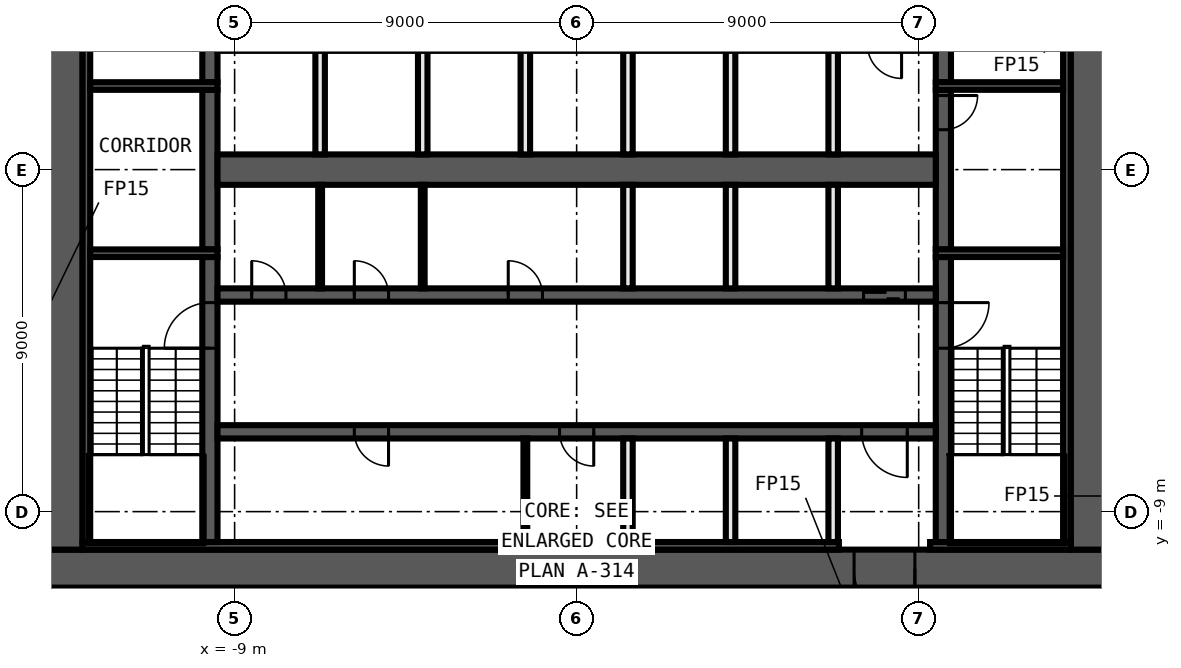
"""IFC4 building model, lengths in metres.
Left out: names, types, materials, properties, quantities, classifications, styles, units other than length and angle.
Written with IfcOpenShell. Run it as: python <this file> out.ifc"""

import sys

from ifc_helpers import new_model, si_unit, direction, frame, frame_2d, origin, place, context, subcontext, project, spatial, rectangle, extrude, element, fill, save


model = new_model("IFC4")
c1 = context("Model", 3, precision=1e-05, world=origin(), true_north=direction((0.0, 1.0)))
c2 = subcontext(c1, "Body", "Model", "MODEL_VIEW")
j1 = project(units=[si_unit("LENGTHUNIT", "METRE"), si_unit("PLANEANGLEUNIT", "RADIAN")], contexts=[c1])
p1 = place(None, origin())
s1 = spatial("IfcSite", under=j1, at=p1, CompositionType="ELEMENT")
p2 = place(p1, origin())
s2 = spatial("IfcBuilding", under=s1, at=p2, CompositionType="ELEMENT")
p3 = place(p2, frame((0.0, 0.0, 102.6)))
s3 = spatial("IfcBuildingStorey", under=s2, at=p3, CompositionType="ELEMENT", Elevation=102.6)
p4 = place(p3, frame((14.0, -10.5, 0.0), z_axis=(0.0, 0.0, 1.0), x_axis=(-1.0, 0.0, 0.0)))
e1 = element("IfcWall", 1, at=p4, inside=s3, PredefinedType="SHEAR", context=c2, shape_type="SweptSolid", body=[
    extrude(rectangle(XDim=28.0, YDim=1.0, at=frame_2d((14.0, 0.0))), origin(), (0.0, 0.0, 1.0), 3.3),
])
p5 = place(p4, frame((5.1, 0.0, 0.0)))
e2 = element("IfcOpeningElement", 2, at=p5, cuts=e1, PredefinedType="OPENING", context=c2, shape_type="SweptSolid", body=[
    extrude(rectangle(XDim=1.6, YDim=2.1, at=frame_2d((0.8, 1.05))), frame((0.0, 0.51, 0.0), z_axis=(0.0, -1.0, 0.0), x_axis=(1.0, 0.0, 0.0)), (0.0, 0.0, 1.0), 1.02),
])
for number, where, z_axis, x_axis in (
    (3, (13.5, 10.0, 0.0), (0.0, 0.0, 1.0), (0.0, -1.0, 0.0)),
    (4, (-13.5, -10.0, 0.0), (0.0, 0.0, 1.0), (0.0, 1.0, 0.0)),
):
    element("IfcWall", number, at=place(p3, frame(where, z_axis=z_axis, x_axis=x_axis)), inside=s3, PredefinedType="SHEAR", context=c2, shape_type="SweptSolid", body=[
        extrude(rectangle(XDim=20.0, YDim=1.0, at=frame_2d((10.0, 0.0))), origin(), (0.0, 0.0, 1.0), 3.3),
    ])
p6 = place(p3, frame((13.0, -9.9, 0.0), z_axis=(0.0, 0.0, 1.0), x_axis=(-1.0, 0.0, 0.0)))
e5 = element("IfcWall", 5, at=p6, inside=s3, PredefinedType="SHEAR", context=c2, shape_type="SweptSolid", body=[
    extrude(rectangle(XDim=3.7, YDim=0.2, at=frame_2d((1.85, 0.0))), origin(), (0.0, 0.0, 1.0), 3.3),
])
p7 = place(p3, frame((6.9, -9.9, 0.0), z_axis=(0.0, 0.0, 1.0), x_axis=(-1.0, 0.0, 0.0)))
e6 = element("IfcWall", 6, at=p7, inside=s3, PredefinedType="SHEAR", context=c2, shape_type="SweptSolid", body=[
    extrude(rectangle(XDim=19.9, YDim=0.2, at=frame_2d((9.95, 0.0))), origin(), (0.0, 0.0, 1.0), 3.3),
])
for number, where, z_axis, x_axis in (
    (7, (12.9, 9.8, 0.0), (0.0, 0.0, 1.0), (0.0, -1.0, 0.0)),
    (8, (-12.9, -9.8, 0.0), (0.0, 0.0, 1.0), (0.0, 1.0, 0.0)),
):
    element("IfcWall", number, at=place(p3, frame(where, z_axis=z_axis, x_axis=x_axis)), inside=s3, PredefinedType="SHEAR", context=c2, shape_type="SweptSolid", body=[
        extrude(rectangle(XDim=19.6, YDim=0.2, at=frame_2d((9.8, 0.0))), origin(), (0.0, 0.0, 1.0), 3.3),
    ])
p8 = place(p3, frame((9.65, -2.3, 0.0), z_axis=(0.0, 0.0, 1.0), x_axis=(0.0, -1.0, 0.0)))
e9 = element("IfcWall", 9, at=p8, inside=s3, PredefinedType="SHEAR", context=c2, shape_type="SweptSolid", body=[
    extrude(rectangle(XDim=7.5, YDim=0.4, at=frame_2d((3.75, 0.0))), origin(), (0.0, 0.0, 1.0), 3.3),
])
p9 = place(p8, frame((1.2, 0.0, 0.0)))
e10 = element("IfcOpeningElement", 10, at=p9, cuts=e9, PredefinedType="OPENING", context=c2, shape_type="SweptSolid", body=[
    extrude(rectangle(XDim=1.2, YDim=2.1, at=frame_2d((0.6, 1.05))), frame((0.0, 0.21, 0.0), z_axis=(0.0, -1.0, 0.0), x_axis=(1.0, 0.0, 0.0)), (0.0, 0.0, 1.0), 0.42),
])
p10 = place(p3, frame((9.65, 2.1, 0.0), z_axis=(0.0, 0.0, 1.0), x_axis=(0.0, -1.0, 0.0)))
e11 = element("IfcWall", 11, at=p10, inside=s3, PredefinedType="SHEAR", context=c2, shape_type="SweptSolid", body=[
    extrude(rectangle(XDim=4.2, YDim=0.4, at=frame_2d((2.1, 0.0))), origin(), (0.0, 0.0, 1.0), 3.3),
])
p11 = place(p10, frame((0.15, 0.0, 0.0)))
e12 = element("IfcOpeningElement", 12, at=p11, cuts=e11, PredefinedType="OPENING", context=c2, shape_type="SweptSolid", body=[
    extrude(rectangle(XDim=0.9, YDim=2.1, at=frame_2d((0.45, 1.05))), frame((0.0, 0.21, 0.0), z_axis=(0.0, -1.0, 0.0), x_axis=(1.0, 0.0, 0.0)), (0.0, 0.0, 1.0), 0.42),
])
p12 = place(p3, frame((9.65, 9.8, 0.0), z_axis=(0.0, 0.0, 1.0), x_axis=(0.0, -1.0, 0.0)))
e13 = element("IfcWall", 13, at=p12, inside=s3, PredefinedType="SHEAR", context=c2, shape_type="SweptSolid", body=[
    extrude(rectangle(XDim=7.5, YDim=0.4, at=frame_2d((3.75, 0.0))), origin(), (0.0, 0.0, 1.0), 3.3),
])
p13 = place(p12, frame((5.1, 0.0, 0.0)))
e14 = element("IfcOpeningElement", 14, at=p13, cuts=e13, PredefinedType="OPENING", context=c2, shape_type="SweptSolid", body=[
    extrude(rectangle(XDim=1.2, YDim=2.1, at=frame_2d((0.6, 1.05))), frame((0.0, 0.21, 0.0), z_axis=(0.0, -1.0, 0.0), x_axis=(1.0, 0.0, 0.0)), (0.0, 0.0, 1.0), 0.42),
])
p14 = place(p3, frame((-9.65, -9.8, 0.0), z_axis=(0.0, 0.0, 1.0), x_axis=(0.0, 1.0, 0.0)))
e15 = element("IfcWall", 15, at=p14, inside=s3, PredefinedType="SHEAR", context=c2, shape_type="SweptSolid", body=[
    extrude(rectangle(XDim=7.5, YDim=0.4, at=frame_2d((3.75, 0.0))), origin(), (0.0, 0.0, 1.0), 3.3),
])
p15 = place(p14, frame((5.1, 0.0, 0.0)))
e16 = element("IfcOpeningElement", 16, at=p15, cuts=e15, PredefinedType="OPENING", context=c2, shape_type="SweptSolid", body=[
    extrude(rectangle(XDim=1.2, YDim=2.1, at=frame_2d((0.6, 1.05))), frame((0.0, 0.21, 0.0), z_axis=(0.0, -1.0, 0.0), x_axis=(1.0, 0.0, 0.0)), (0.0, 0.0, 1.0), 0.42),
])
p16 = place(p3, frame((-9.65, -2.1, 0.0), z_axis=(0.0, 0.0, 1.0), x_axis=(0.0, 1.0, 0.0)))
e17 = element("IfcWall", 17, at=p16, inside=s3, PredefinedType="SHEAR", context=c2, shape_type="SweptSolid", body=[
    extrude(rectangle(XDim=4.2, YDim=0.4, at=frame_2d((2.1, 0.0))), origin(), (0.0, 0.0, 1.0), 3.3),
])
p17 = place(p3, frame((-9.65, 2.3, 0.0), z_axis=(0.0, 0.0, 1.0), x_axis=(0.0, 1.0, 0.0)))
e18 = element("IfcWall", 18, at=p17, inside=s3, PredefinedType="SHEAR", context=c2, shape_type="SweptSolid", body=[
    extrude(rectangle(XDim=7.5, YDim=0.4, at=frame_2d((3.75, 0.0))), origin(), (0.0, 0.0, 1.0), 3.3),
])
p18 = place(p17, frame((1.2, 0.0, 0.0)))
e19 = element("IfcOpeningElement", 19, at=p18, cuts=e18, PredefinedType="OPENING", context=c2, shape_type="SweptSolid", body=[
    extrude(rectangle(XDim=1.2, YDim=2.1, at=frame_2d((0.6, 1.05))), frame((0.0, 0.21, 0.0), z_axis=(0.0, -1.0, 0.0), x_axis=(1.0, 0.0, 0.0)), (0.0, 0.0, 1.0), 0.42),
])
for number, where, z_axis, x_axis in (
    (20, (9.45, 2.2, 0.0), (0.0, 0.0, 1.0), (1.0, 0.0, 0.0)),
    (21, (-9.45, 2.2, 0.0), (0.0, 0.0, 1.0), (-1.0, 0.0, 0.0)),
    (22, (9.45, -2.2, 0.0), (0.0, 0.0, 1.0), (1.0, 0.0, 0.0)),
    (23, (-9.45, -2.2, 0.0), (0.0, 0.0, 1.0), (-1.0, 0.0, 0.0)),
):
    element("IfcWall", number, at=place(p3, frame(where, z_axis=z_axis, x_axis=x_axis)), inside=s3, PredefinedType="SHEAR", context=c2, shape_type="SweptSolid", body=[
        extrude(rectangle(XDim=3.35, YDim=0.2, at=frame_2d((1.675, 0.0))), origin(), (0.0, 0.0, 1.0), 3.3),
    ])
p19 = place(p3, frame((-9.45, -3.3, 0.0), z_axis=(0.0, 0.0, 1.0), x_axis=(1.0, 0.0, 0.0)))
e24 = element("IfcWall", 24, at=p19, inside=s3, PredefinedType="SHEAR", context=c2, shape_type="SweptSolid", body=[
    extrude(rectangle(XDim=18.9, YDim=0.35, at=frame_2d((9.45, 0.0))), origin(), (0.0, 0.0, 1.0), 3.3),
])
p20 = place(p19, frame((17.0, 0.0, 0.0)))
e25 = element("IfcOpeningElement", 25, at=p20, cuts=e24, PredefinedType="OPENING", context=c2, shape_type="SweptSolid", body=[
    extrude(rectangle(XDim=1.1, YDim=2.1, at=frame_2d((0.55, 1.05))), frame((0.0, 0.185, 0.0), z_axis=(0.0, -1.0, 0.0), x_axis=(1.0, 0.0, 0.0)), (0.0, 0.0, 1.0), 0.37),
])
p21 = place(p19, frame((0.9, 0.0, 0.0)))
e26 = element("IfcOpeningElement", 26, at=p21, cuts=e24, PredefinedType="OPENING", context=c2, shape_type="SweptSolid", body=[
    extrude(rectangle(XDim=0.9, YDim=2.1, at=frame_2d((0.45, 1.05))), frame((0.0, 0.185, 0.0), z_axis=(0.0, -1.0, 0.0), x_axis=(1.0, 0.0, 0.0)), (0.0, 0.0, 1.0), 0.37),
])
p22 = place(p19, frame((3.6, 0.0, 0.0)))
e27 = element("IfcOpeningElement", 27, at=p22, cuts=e24, PredefinedType="OPENING", context=c2, shape_type="SweptSolid", body=[
    extrude(rectangle(XDim=0.9, YDim=2.1, at=frame_2d((0.45, 1.05))), frame((0.0, 0.185, 0.0), z_axis=(0.0, -1.0, 0.0), x_axis=(1.0, 0.0, 0.0)), (0.0, 0.0, 1.0), 0.37),
])
p23 = place(p19, frame((7.65, 0.0, 0.0)))
e28 = element("IfcOpeningElement", 28, at=p23, cuts=e24, PredefinedType="OPENING", context=c2, shape_type="SweptSolid", body=[
    extrude(rectangle(XDim=0.9, YDim=2.1, at=frame_2d((0.45, 1.05))), frame((0.0, 0.185, 0.0), z_axis=(0.0, -1.0, 0.0), x_axis=(1.0, 0.0, 0.0)), (0.0, 0.0, 1.0), 0.37),
])
p24 = place(p3, frame((9.45, -6.9, 0.0), z_axis=(0.0, 0.0, 1.0), x_axis=(-1.0, 0.0, 0.0)))
e29 = element("IfcWall", 29, at=p24, inside=s3, PredefinedType="SHEAR", context=c2, shape_type="SweptSolid", body=[
    extrude(rectangle(XDim=18.9, YDim=0.35, at=frame_2d((9.45, 0.0))), origin(), (0.0, 0.0, 1.0), 3.3),
])
p25 = place(p24, frame((0.75, 0.0, 0.0)))
e30 = element("IfcOpeningElement", 30, at=p25, cuts=e29, PredefinedType="OPENING", context=c2, shape_type="SweptSolid", body=[
    extrude(rectangle(XDim=1.2, YDim=2.1, at=frame_2d((0.6, 1.05))), frame((0.0, 0.185, 0.0), z_axis=(0.0, -1.0, 0.0), x_axis=(1.0, 0.0, 0.0)), (0.0, 0.0, 1.0), 0.37),
])
p26 = place(p24, frame((14.4, 0.0, 0.0)))
e31 = element("IfcOpeningElement", 31, at=p26, cuts=e29, PredefinedType="OPENING", context=c2, shape_type="SweptSolid", body=[
    extrude(rectangle(XDim=0.9, YDim=2.1, at=frame_2d((0.45, 1.05))), frame((0.0, 0.185, 0.0), z_axis=(0.0, -1.0, 0.0), x_axis=(1.0, 0.0, 0.0)), (0.0, 0.0, 1.0), 0.37),
])
p27 = place(p24, frame((9.0, 0.0, 0.0)))
e32 = element("IfcOpeningElement", 32, at=p27, cuts=e29, PredefinedType="OPENING", context=c2, shape_type="SweptSolid", body=[
    extrude(rectangle(XDim=0.9, YDim=2.1, at=frame_2d((0.45, 1.05))), frame((0.0, 0.185, 0.0), z_axis=(0.0, -1.0, 0.0), x_axis=(1.0, 0.0, 0.0)), (0.0, 0.0, 1.0), 0.37),
])
p28 = place(p3, frame((-9.45, 0.0, 0.0), z_axis=(0.0, 0.0, 1.0), x_axis=(1.0, 0.0, 0.0)))
e33 = element("IfcWall", 33, at=p28, inside=s3, PredefinedType="SHEAR", context=c2, shape_type="SweptSolid", body=[
    extrude(rectangle(XDim=18.9, YDim=0.8, at=frame_2d((9.45, 0.0))), origin(), (0.0, 0.0, 1.0), 3.3),
])
for number, where, z_axis, x_axis in (
    (34, (6.75, -9.8, 0.0), (0.0, 0.0, 1.0), (0.0, 1.0, 0.0)),
    (35, (6.75, -3.125, 0.0), (0.0, 0.0, 1.0), (0.0, 1.0, 0.0)),
    (36, (6.75, 0.4, 0.0), (0.0, 0.0, 1.0), (0.0, 1.0, 0.0)),
    (37, (4.05, -9.8, 0.0), (0.0, 0.0, 1.0), (0.0, 1.0, 0.0)),
    (38, (4.05, -3.125, 0.0), (0.0, 0.0, 1.0), (0.0, 1.0, 0.0)),
    (39, (4.05, 0.4, 0.0), (0.0, 0.0, 1.0), (0.0, 1.0, 0.0)),
    (40, (1.35, -9.8, 0.0), (0.0, 0.0, 1.0), (0.0, 1.0, 0.0)),
    (41, (1.35, -3.125, 0.0), (0.0, 0.0, 1.0), (0.0, 1.0, 0.0)),
    (42, (1.35, 0.4, 0.0), (0.0, 0.0, 1.0), (0.0, 1.0, 0.0)),
):
    element("IfcWall", number, at=place(p3, frame(where, z_axis=z_axis, x_axis=x_axis)), inside=s3, PredefinedType="SOLIDWALL", context=c2, shape_type="SweptSolid", body=[
        extrude(rectangle(XDim=2.725, YDim=0.25, at=frame_2d((1.363, 0.0))), origin(), (0.0, 0.0, 1.0), 3.3),
    ])
p29 = place(p3, frame((-1.35, -9.8, 0.0), z_axis=(0.0, 0.0, 1.0), x_axis=(0.0, 1.0, 0.0)))
e43 = element("IfcWall", 43, at=p29, inside=s3, PredefinedType="PARTITIONING", context=c2, shape_type="SweptSolid", body=[
    extrude(rectangle(XDim=2.725, YDim=0.1, at=frame_2d((1.363, 0.0))), origin(), (0.0, 0.0, 1.0), 3.3),
])
p30 = place(p3, frame((-1.35, 0.4, 0.0), z_axis=(0.0, 0.0, 1.0), x_axis=(0.0, 1.0, 0.0)))
e44 = element("IfcWall", 44, at=p30, inside=s3, PredefinedType="SOLIDWALL", context=c2, shape_type="SweptSolid", body=[
    extrude(rectangle(XDim=2.725, YDim=0.25, at=frame_2d((1.363, 0.0))), origin(), (0.0, 0.0, 1.0), 3.3),
])
p31 = place(p3, frame((-4.05, -3.125, 0.0), z_axis=(0.0, 0.0, 1.0), x_axis=(0.0, 1.0, 0.0)))
e45 = element("IfcWall", 45, at=p31, inside=s3, PredefinedType="PARTITIONING", context=c2, shape_type="SweptSolid", body=[
    extrude(rectangle(XDim=2.725, YDim=0.1, at=frame_2d((1.363, 0.0))), origin(), (0.0, 0.0, 1.0), 3.3),
])
p32 = place(p3, frame((-4.05, 0.4, 0.0), z_axis=(0.0, 0.0, 1.0), x_axis=(0.0, 1.0, 0.0)))
e46 = element("IfcWall", 46, at=p32, inside=s3, PredefinedType="SOLIDWALL", context=c2, shape_type="SweptSolid", body=[
    extrude(rectangle(XDim=2.725, YDim=0.25, at=frame_2d((1.363, 0.0))), origin(), (0.0, 0.0, 1.0), 3.3),
])
p33 = place(p3, frame((-6.75, -3.125, 0.0), z_axis=(0.0, 0.0, 1.0), x_axis=(0.0, 1.0, 0.0)))
e47 = element("IfcWall", 47, at=p33, inside=s3, PredefinedType="PARTITIONING", context=c2, shape_type="SweptSolid", body=[
    extrude(rectangle(XDim=2.725, YDim=0.1, at=frame_2d((1.363, 0.0))), origin(), (0.0, 0.0, 1.0), 3.3),
])
p34 = place(p3, frame((-6.75, 0.4, 0.0), z_axis=(0.0, 0.0, 1.0), x_axis=(0.0, 1.0, 0.0)))
e48 = element("IfcWall", 48, at=p34, inside=s3, PredefinedType="SOLIDWALL", context=c2, shape_type="SweptSolid", body=[
    extrude(rectangle(XDim=2.725, YDim=0.25, at=frame_2d((1.363, 0.0))), origin(), (0.0, 0.0, 1.0), 3.3),
])
p35 = place(p11, origin())
e49 = element("IfcDoor", 49, at=p35, inside=s3, OperationType="SINGLE_SWING_RIGHT", PredefinedType="DOOR", context=c2, shape_type="SweptSolid", body=[
    extrude(rectangle(XDim=0.9, YDim=2.1, at=frame_2d((0.45, 1.05))), frame((0.0, 0.025, 0.0), z_axis=(0.0, -1.0, 0.0), x_axis=(1.0, 0.0, 0.0)), (0.0, 0.0, 1.0), 0.05),
])
fill(e12, e49)
p36 = place(p20, origin())
e50 = element("IfcDoor", 50, at=p36, inside=s3, OperationType="DOUBLE_DOOR_SLIDING", PredefinedType="DOOR", context=c2, shape_type="SweptSolid", body=[
    extrude(rectangle(XDim=1.1, YDim=2.1, at=frame_2d((0.55, 1.05))), frame((0.0, 0.025, 0.0), z_axis=(0.0, -1.0, 0.0), x_axis=(1.0, 0.0, 0.0)), (0.0, 0.0, 1.0), 0.05),
])
fill(e25, e50)
p37 = place(p5, origin())
e51 = element("IfcDoor", 51, at=p37, inside=s3, OperationType="DOUBLE_DOOR_SINGLE_SWING", PredefinedType="DOOR", context=c2, shape_type="SweptSolid", body=[
    extrude(rectangle(XDim=1.6, YDim=2.1, at=frame_2d((0.8, 1.05))), frame((0.0, 0.025, 0.0), z_axis=(0.0, -1.0, 0.0), x_axis=(1.0, 0.0, 0.0)), (0.0, 0.0, 1.0), 0.05),
])
fill(e2, e51)
p38 = place(p25, origin())
e52 = element("IfcDoor", 52, at=p38, inside=s3, OperationType="SINGLE_SWING_LEFT", PredefinedType="DOOR", context=c2, shape_type="SweptSolid", body=[
    extrude(rectangle(XDim=1.2, YDim=2.1, at=frame_2d((0.6, 1.05))), frame((0.0, 0.025, 0.0), z_axis=(0.0, -1.0, 0.0), x_axis=(1.0, 0.0, 0.0)), (0.0, 0.0, 1.0), 0.05),
])
fill(e30, e52)
p39 = place(p21, origin())
e53 = element("IfcDoor", 53, at=p39, inside=s3, OperationType="SINGLE_SWING_RIGHT", PredefinedType="DOOR", context=c2, shape_type="SweptSolid", body=[
    extrude(rectangle(XDim=0.9, YDim=2.1, at=frame_2d((0.45, 1.05))), frame((0.0, 0.025, 0.0), z_axis=(0.0, -1.0, 0.0), x_axis=(1.0, 0.0, 0.0)), (0.0, 0.0, 1.0), 0.05),
])
fill(e26, e53)
p40 = place(p22, origin())
e54 = element("IfcDoor", 54, at=p40, inside=s3, OperationType="SINGLE_SWING_LEFT", PredefinedType="DOOR", context=c2, shape_type="SweptSolid", body=[
    extrude(rectangle(XDim=0.9, YDim=2.1, at=frame_2d((0.45, 1.05))), frame((0.0, 0.025, 0.0), z_axis=(0.0, -1.0, 0.0), x_axis=(1.0, 0.0, 0.0)), (0.0, 0.0, 1.0), 0.05),
])
fill(e27, e54)
p41 = place(p23, origin())
e55 = element("IfcDoor", 55, at=p41, inside=s3, OperationType="SINGLE_SWING_RIGHT", PredefinedType="DOOR", context=c2, shape_type="SweptSolid", body=[
    extrude(rectangle(XDim=0.9, YDim=2.1, at=frame_2d((0.45, 1.05))), frame((0.0, 0.025, 0.0), z_axis=(0.0, -1.0, 0.0), x_axis=(1.0, 0.0, 0.0)), (0.0, 0.0, 1.0), 0.05),
])
fill(e28, e55)
p42 = place(p26, origin())
e56 = element("IfcDoor", 56, at=p42, inside=s3, OperationType="SINGLE_SWING_LEFT", PredefinedType="DOOR", context=c2, shape_type="SweptSolid", body=[
    extrude(rectangle(XDim=0.9, YDim=2.1, at=frame_2d((0.45, 1.05))), frame((0.0, 0.025, 0.0), z_axis=(0.0, -1.0, 0.0), x_axis=(1.0, 0.0, 0.0)), (0.0, 0.0, 1.0), 0.05),
])
fill(e31, e56)
p43 = place(p27, origin())
e57 = element("IfcDoor", 57, at=p43, inside=s3, OperationType="SINGLE_SWING_RIGHT", PredefinedType="DOOR", context=c2, shape_type="SweptSolid", body=[
    extrude(rectangle(XDim=0.9, YDim=2.1, at=frame_2d((0.45, 1.05))), frame((0.0, 0.025, 0.0), z_axis=(0.0, -1.0, 0.0), x_axis=(1.0, 0.0, 0.0)), (0.0, 0.0, 1.0), 0.05),
])
fill(e32, e57)
p44 = place(p9, origin())
e58 = element("IfcDoor", 58, at=p44, inside=s3, OperationType="SINGLE_SWING_RIGHT", PredefinedType="DOOR", context=c2, shape_type="SweptSolid", body=[
    extrude(rectangle(XDim=1.2, YDim=2.1, at=frame_2d((0.6, 1.05))), frame((0.0, 0.025, 0.0), z_axis=(0.0, -1.0, 0.0), x_axis=(1.0, 0.0, 0.0)), (0.0, 0.0, 1.0), 0.05),
])
fill(e10, e58)
p45 = place(p15, origin())
e59 = element("IfcDoor", 59, at=p45, inside=s3, OperationType="SINGLE_SWING_LEFT", PredefinedType="DOOR", context=c2, shape_type="SweptSolid", body=[
    extrude(rectangle(XDim=1.2, YDim=2.1, at=frame_2d((0.6, 1.05))), frame((0.0, 0.025, 0.0), z_axis=(0.0, -1.0, 0.0), x_axis=(1.0, 0.0, 0.0)), (0.0, 0.0, 1.0), 0.05),
])
fill(e16, e59)
save(model, sys.argv[1])
